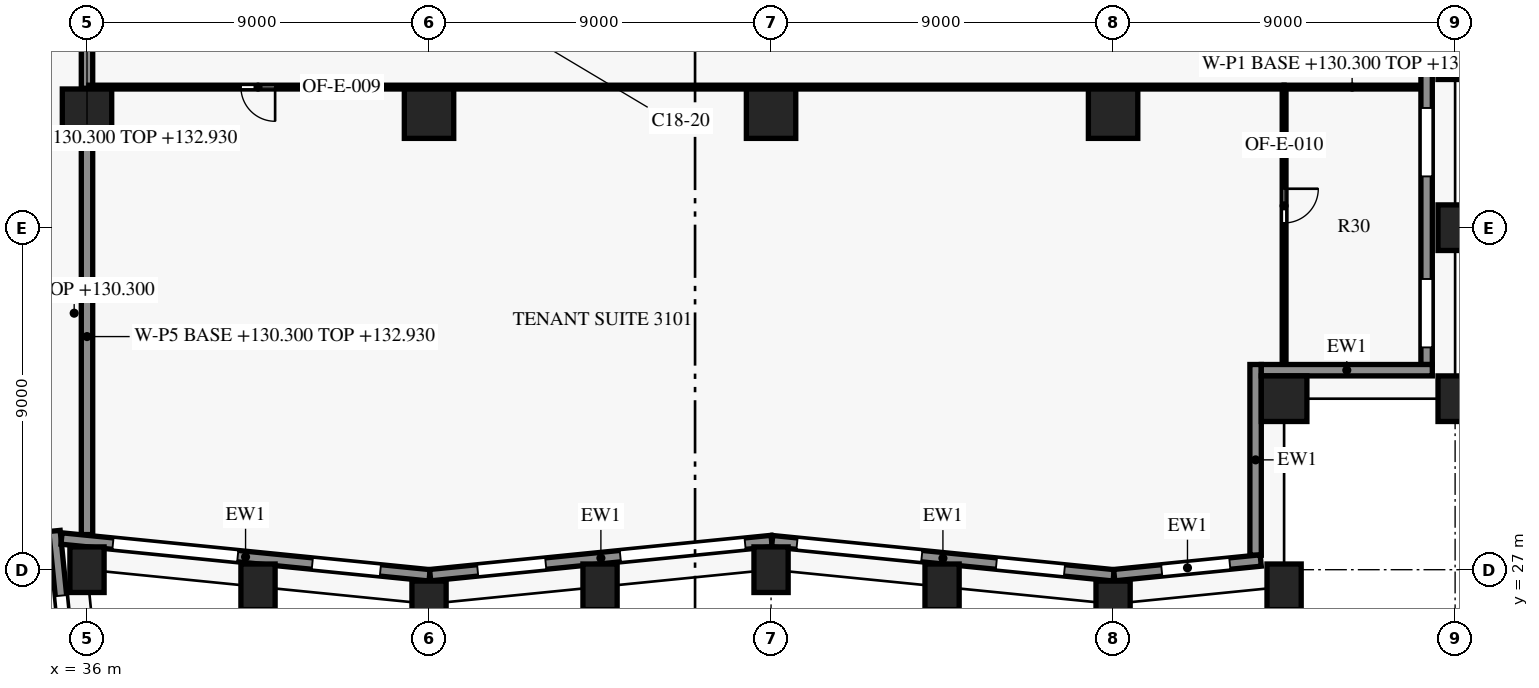
"""IFC4 building model, lengths in metres.
Left out: names, types, materials, properties, quantities, classifications, styles, units other than length and angle.
Written with IfcOpenShell. Run it as: python <this file> out.ifc"""

import sys

from ifc_helpers import new_model, si_unit, direction, frame, frame_2d, origin, origin_2d, place, context, subcontext, project, spatial, rectangle, extrude, element, fill, save


model = new_model("IFC4")
c1 = context("Model", 3, precision=1e-05, world=origin(), true_north=direction((0.0, 1.0)))
c2 = subcontext(c1, "Body", "Model", "MODEL_VIEW")
j1 = project(units=[si_unit("LENGTHUNIT", "METRE"), si_unit("PLANEANGLEUNIT", "RADIAN")], contexts=[c1])
p1 = place(None, origin())
s1 = spatial("IfcSite", under=j1, at=p1, CompositionType="ELEMENT")
p2 = place(p1, origin())
s2 = spatial("IfcBuilding", under=s1, at=p2, CompositionType="ELEMENT")
p3 = place(p2, frame((0.0, 0.0, 130.3)))
s3 = spatial("IfcBuildingStorey", under=s2, at=p3, CompositionType="ELEMENT", Elevation=130.3)
for number, where, z_axis, x_axis in (
    (1, (36.0, 27.0, 0.0), (0.0, 0.0, 1.0), (-0.1, 0.995, 0.0)),
    (2, (40.5, 26.55, 0.0), (0.0, 0.0, 1.0), (0.995, -0.1, 0.0)),
    (3, (45.0, 26.1, 0.0), (0.0, 0.0, 1.0), (1.0, 0.0, 0.0)),
    (4, (49.5, 26.55, 0.0), (0.0, 0.0, 1.0), (0.995, 0.1, 0.0)),
    (5, (54.0, 27.0, 0.0), (0.0, 0.0, 1.0), (1.0, 0.0, 0.0)),
    (6, (58.5, 26.55, 0.0), (0.0, 0.0, 1.0), (0.995, -0.1, 0.0)),
    (7, (63.0, 26.1, 0.0), (0.0, 0.0, 1.0), (1.0, 0.0, 0.0)),
    (8, (67.5, 26.55, 0.0), (0.0, 0.0, 1.0), (0.995, 0.1, 0.0)),
    (9, (72.0, 31.5, 0.0), (0.0, 0.0, 1.0), (0.0, 1.0, 0.0)),
    (10, (72.0, 36.0, 0.0), (0.0, 0.0, 1.0), (0.0, 1.0, 0.0)),
    (11, (72.0, 40.5, 0.0), (0.0, 0.0, 1.0), (0.0, 1.0, 0.0)),
):
    element("IfcColumn", number, at=place(p3, frame(where, z_axis=z_axis, x_axis=x_axis)), inside=s3, PredefinedType="COLUMN", context=c2, shape_type="SweptSolid", body=[
        extrude(rectangle(XDim=0.9, YDim=1.2, at=origin_2d()), origin(), (0.0, 0.0, 1.0), 3.8),
    ])
p4 = place(p3, frame((67.5, 31.5, 0.0), z_axis=(0.0, 0.0, 1.0), x_axis=(1.0, 0.0, 0.0)))
e12 = element("IfcColumn", 12, at=p4, inside=s3, PredefinedType="COLUMN", context=c2, shape_type="SweptSolid", body=[
    extrude(rectangle(XDim=1.2, YDim=1.2, at=origin_2d()), origin(), (0.0, 0.0, 1.0), 3.8),
])
for number, where, z_axis, x_axis in (
    (13, (36.0, 39.0, 0.0), (0.0, 0.0, 1.0), (1.0, 0.0, 0.0)),
    (14, (45.0, 39.0, 0.0), (0.0, 0.0, 1.0), (1.0, 0.0, 0.0)),
    (15, (54.0, 39.0, 0.0), (0.0, 0.0, 1.0), (1.0, 0.0, 0.0)),
    (16, (63.0, 39.0, 0.0), (0.0, 0.0, 1.0), (1.0, 0.0, 0.0)),
):
    element("IfcColumn", number, at=place(p3, frame(where, z_axis=z_axis, x_axis=x_axis)), inside=s3, PredefinedType="COLUMN", context=c2, shape_type="SweptSolid", body=[
        extrude(rectangle(XDim=1.3, YDim=1.3, at=origin_2d()), origin(), (0.0, 0.0, 1.0), 3.8),
    ])
p5 = place(p3, frame((35.144, 28.02, 0.0), z_axis=(0.0, 0.0, 1.0), x_axis=(0.099503719021, -0.99503719021, 0.0)))
e17 = element("IfcWall", 17, at=p5, inside=s3, PredefinedType="SOLIDWALL", context=c2, shape_type="SweptSolid", body=[
    extrude(rectangle(XDim=10.04, YDim=0.3, at=frame_2d((5.02, 0.0))), origin(), (0.0, 0.0, 1.0), 3.15),
])
p6 = place(p5, frame((1.711, 0.0, 0.15)))
e18 = element("IfcOpeningElement", 18, at=p6, cuts=e17, PredefinedType="OPENING", context=c2, shape_type="SweptSolid", body=[
    extrude(rectangle(XDim=3.3, YDim=2.4, at=frame_2d((1.65, 1.2))), frame((0.0, 0.16, 0.0), z_axis=(0.0, -1.0, 0.0), x_axis=(1.0, 0.0, 0.0)), (0.0, 0.0, 1.0), 0.32),
])
p7 = place(p5, frame((6.984, 0.0, 0.75)))
e19 = element("IfcOpeningElement", 19, at=p7, cuts=e17, PredefinedType="OPENING", context=c2, shape_type="SweptSolid", body=[
    extrude(rectangle(XDim=1.8, YDim=1.8, at=frame_2d((0.9, 0.9))), frame((0.0, 0.16, 0.0), z_axis=(0.0, -1.0, 0.0), x_axis=(1.0, 0.0, 0.0)), (0.0, 0.0, 1.0), 0.32),
])
p8 = place(p3, frame((45.015, 26.852, 0.0), z_axis=(0.0, 0.0, 1.0), x_axis=(-0.995037438546, 0.099501235631, 0.0)))
e20 = element("IfcWall", 20, at=p8, inside=s3, PredefinedType="SOLIDWALL", context=c2, shape_type="SweptSolid", body=[
    extrude(rectangle(XDim=9.734, YDim=0.3, at=frame_2d((4.867, 0.0))), origin(), (0.0, 0.0, 1.0), 3.15),
])
p9 = place(p8, frame((1.301, 0.0, 0.75)))
e21 = element("IfcOpeningElement", 21, at=p9, cuts=e20, PredefinedType="OPENING", context=c2, shape_type="SweptSolid", body=[
    extrude(rectangle(XDim=1.8, YDim=1.8, at=frame_2d((0.9, 0.9))), frame((0.0, 0.16, 0.0), z_axis=(0.0, -1.0, 0.0), x_axis=(1.0, 0.0, 0.0)), (0.0, 0.0, 1.0), 0.32),
])
p10 = place(p8, frame((5.073, 0.0, 0.15)))
e22 = element("IfcOpeningElement", 22, at=p10, cuts=e20, PredefinedType="OPENING", context=c2, shape_type="SweptSolid", body=[
    extrude(rectangle(XDim=3.3, YDim=2.4, at=frame_2d((1.65, 1.2))), frame((0.0, 0.16, 0.0), z_axis=(0.0, -1.0, 0.0), x_axis=(1.0, 0.0, 0.0)), (0.0, 0.0, 1.0), 0.32),
])
p11 = place(p3, frame((54.015, 27.755, 0.0), z_axis=(0.0, 0.0, 1.0), x_axis=(-0.995037993253, -0.099495688264, 0.0)))
e23 = element("IfcWall", 23, at=p11, inside=s3, PredefinedType="SOLIDWALL", context=c2, shape_type="SweptSolid", body=[
    extrude(rectangle(XDim=9.03, YDim=0.3, at=frame_2d((4.515, 0.0))), origin(), (0.0, 0.0, 1.0), 3.15),
])
p12 = place(p11, frame((0.701, 0.0, 0.15)))
e24 = element("IfcOpeningElement", 24, at=p12, cuts=e23, PredefinedType="OPENING", context=c2, shape_type="SweptSolid", body=[
    extrude(rectangle(XDim=3.3, YDim=2.4, at=frame_2d((1.65, 1.2))), frame((0.0, 0.16, 0.0), z_axis=(0.0, -1.0, 0.0), x_axis=(1.0, 0.0, 0.0)), (0.0, 0.0, 1.0), 0.32),
])
p13 = place(p11, frame((5.974, 0.0, 0.75)))
e25 = element("IfcOpeningElement", 25, at=p13, cuts=e23, PredefinedType="OPENING", context=c2, shape_type="SweptSolid", body=[
    extrude(rectangle(XDim=1.8, YDim=1.8, at=frame_2d((0.9, 0.9))), frame((0.0, 0.16, 0.0), z_axis=(0.0, -1.0, 0.0), x_axis=(1.0, 0.0, 0.0)), (0.0, 0.0, 1.0), 0.32),
])
p14 = place(p3, frame((63.015, 26.852, 0.0), z_axis=(0.0, 0.0, 1.0), x_axis=(-0.995037993253, 0.099495688264, 0.0)))
e26 = element("IfcWall", 26, at=p14, inside=s3, PredefinedType="SOLIDWALL", context=c2, shape_type="SweptSolid", body=[
    extrude(rectangle(XDim=9.03, YDim=0.3, at=frame_2d((4.515, 0.0))), origin(), (0.0, 0.0, 1.0), 3.15),
])
p15 = place(p14, frame((1.301, 0.0, 0.75)))
e27 = element("IfcOpeningElement", 27, at=p15, cuts=e26, PredefinedType="OPENING", context=c2, shape_type="SweptSolid", body=[
    extrude(rectangle(XDim=1.8, YDim=1.8, at=frame_2d((0.9, 0.9))), frame((0.0, 0.16, 0.0), z_axis=(0.0, -1.0, 0.0), x_axis=(1.0, 0.0, 0.0)), (0.0, 0.0, 1.0), 0.32),
])
p16 = place(p14, frame((5.073, 0.0, 0.15)))
e28 = element("IfcOpeningElement", 28, at=p16, cuts=e26, PredefinedType="OPENING", context=c2, shape_type="SweptSolid", body=[
    extrude(rectangle(XDim=3.3, YDim=2.4, at=frame_2d((1.65, 1.2))), frame((0.0, 0.16, 0.0), z_axis=(0.0, -1.0, 0.0), x_axis=(1.0, 0.0, 0.0)), (0.0, 0.0, 1.0), 0.32),
])
p17 = place(p3, frame((66.885, 27.242, 0.0), z_axis=(0.0, 0.0, 1.0), x_axis=(-0.995037814081, -0.099497480111, 0.0)))
e29 = element("IfcWall", 29, at=p17, inside=s3, PredefinedType="SOLIDWALL", context=c2, shape_type="SweptSolid", body=[
    extrude(rectangle(XDim=3.875, YDim=0.3, at=frame_2d((1.937, 0.0))), origin(), (0.0, 0.0, 1.0), 3.15),
])
p18 = place(p17, frame((0.818, 0.0, 0.75)))
e30 = element("IfcOpeningElement", 30, at=p18, cuts=e29, PredefinedType="OPENING", context=c2, shape_type="SweptSolid", body=[
    extrude(rectangle(XDim=1.8, YDim=1.8, at=frame_2d((0.9, 0.9))), frame((0.0, 0.16, 0.0), z_axis=(0.0, -1.0, 0.0), x_axis=(1.0, 0.0, 0.0)), (0.0, 0.0, 1.0), 0.32),
])
p19 = place(p3, frame((66.75, 32.4, 0.0), z_axis=(0.0, 0.0, 1.0), x_axis=(0.0, -1.0, 0.0)))
e31 = element("IfcWall", 31, at=p19, inside=s3, PredefinedType="SOLIDWALL", context=c2, shape_type="SweptSolid", body=[
    extrude(rectangle(XDim=5.019, YDim=0.3, at=frame_2d((2.51, 0.0))), origin(), (0.0, 0.0, 1.0), 3.15),
])
p20 = place(p3, frame((71.4, 32.25, 0.0), z_axis=(0.0, 0.0, 1.0), x_axis=(-1.0, 0.0, 0.0)))
e32 = element("IfcWall", 32, at=p20, inside=s3, PredefinedType="SOLIDWALL", context=c2, shape_type="SweptSolid", body=[
    extrude(rectangle(XDim=4.5, YDim=0.3, at=frame_2d((2.25, 0.0))), origin(), (0.0, 0.0, 1.0), 3.15),
])
p21 = place(p3, frame((71.25, 57.9, 0.0), z_axis=(0.0, 0.0, 1.0), x_axis=(0.0, -1.0, 0.0)))
e33 = element("IfcWall", 33, at=p21, inside=s3, PredefinedType="SOLIDWALL", context=c2, shape_type="SweptSolid", body=[
    extrude(rectangle(XDim=25.502, YDim=0.3, at=frame_2d((12.751, 0.0))), origin(), (0.0, 0.0, 1.0), 3.15),
])
p22 = place(p21, frame((0.75, 0.0, 0.75)))
e34 = element("IfcOpeningElement", 34, at=p22, cuts=e33, PredefinedType="OPENING", context=c2, shape_type="SweptSolid", body=[
    extrude(rectangle(XDim=1.8, YDim=1.8, at=frame_2d((0.9, 0.9))), frame((0.0, 0.16, 0.0), z_axis=(0.0, -1.0, 0.0), x_axis=(1.0, 0.0, 0.0)), (0.0, 0.0, 1.0), 0.32),
])
p23 = place(p21, frame((5.25, 0.0, 0.75)))
e35 = element("IfcOpeningElement", 35, at=p23, cuts=e33, PredefinedType="OPENING", context=c2, shape_type="SweptSolid", body=[
    extrude(rectangle(XDim=1.8, YDim=1.8, at=frame_2d((0.9, 0.9))), frame((0.0, 0.16, 0.0), z_axis=(0.0, -1.0, 0.0), x_axis=(1.0, 0.0, 0.0)), (0.0, 0.0, 1.0), 0.32),
])
p24 = place(p21, frame((9.0, 0.0, 0.15)))
e36 = element("IfcOpeningElement", 36, at=p24, cuts=e33, PredefinedType="OPENING", context=c2, shape_type="SweptSolid", body=[
    extrude(rectangle(XDim=3.3, YDim=2.4, at=frame_2d((1.65, 1.2))), frame((0.0, 0.16, 0.0), z_axis=(0.0, -1.0, 0.0), x_axis=(1.0, 0.0, 0.0)), (0.0, 0.0, 1.0), 0.32),
])
p25 = place(p21, frame((13.5, 0.0, 0.15)))
e37 = element("IfcOpeningElement", 37, at=p25, cuts=e33, PredefinedType="OPENING", context=c2, shape_type="SweptSolid", body=[
    extrude(rectangle(XDim=3.3, YDim=2.4, at=frame_2d((1.65, 1.2))), frame((0.0, 0.16, 0.0), z_axis=(0.0, -1.0, 0.0), x_axis=(1.0, 0.0, 0.0)), (0.0, 0.0, 1.0), 0.32),
])
p26 = place(p21, frame((18.75, 0.0, 0.75)))
e38 = element("IfcOpeningElement", 38, at=p26, cuts=e33, PredefinedType="OPENING", context=c2, shape_type="SweptSolid", body=[
    extrude(rectangle(XDim=1.8, YDim=1.8, at=frame_2d((0.9, 0.9))), frame((0.0, 0.16, 0.0), z_axis=(0.0, -1.0, 0.0), x_axis=(1.0, 0.0, 0.0)), (0.0, 0.0, 1.0), 0.32),
])
p27 = place(p21, frame((23.25, 0.0, 0.75)))
e39 = element("IfcOpeningElement", 39, at=p27, cuts=e33, PredefinedType="OPENING", context=c2, shape_type="SweptSolid", body=[
    extrude(rectangle(XDim=1.8, YDim=1.8, at=frame_2d((0.9, 0.9))), frame((0.0, 0.16, 0.0), z_axis=(0.0, -1.0, 0.0), x_axis=(1.0, 0.0, 0.0)), (0.0, 0.0, 1.0), 0.32),
])
for number, where, z_axis, x_axis in (
    (40, (24.655, 27.0, 0.0), (0.0, 0.0, 1.0), (1.0, 0.0, 0.0)),
    (41, (36.0, 27.925, 0.0), (0.0, 0.0, 1.0), (0.0, 1.0, 0.0)),
):
    element("IfcWall", number, at=place(p3, frame(where, z_axis=z_axis, x_axis=x_axis)), inside=s3, PredefinedType="PARTITIONING", context=c2, shape_type="SweptSolid", body=[
        extrude(rectangle(XDim=10.42, YDim=0.3, at=frame_2d((5.21, 0.0))), origin(), (0.0, 0.0, 1.0), 2.63),
    ])
p28 = place(p3, frame((67.5, 39.65, 0.0), z_axis=(0.0, 0.0, 1.0), x_axis=(0.0, -1.0, 0.0)))
e42 = element("IfcWall", 42, at=p28, inside=s3, PredefinedType="PARTITIONING", context=c2, shape_type="SweptSolid", body=[
    extrude(rectangle(XDim=7.23, YDim=0.1, at=frame_2d((3.615, 0.0))), origin(), (0.0, 0.0, 1.0), 2.63),
])
p29 = place(p28, frame((2.625, 0.0, 0.0)))
e43 = element("IfcOpeningElement", 43, at=p29, cuts=e42, PredefinedType="OPENING", context=c2, shape_type="SweptSolid", body=[
    extrude(rectangle(XDim=0.9, YDim=2.1, at=frame_2d((0.45, 1.05))), frame((0.0, 0.06, 0.0), z_axis=(0.0, -1.0, 0.0), x_axis=(1.0, 0.0, 0.0)), (0.0, 0.0, 1.0), 0.12),
])
p30 = place(p3, frame((67.5, 39.7, 0.0), z_axis=(0.0, 0.0, 1.0), x_axis=(-1.0, 0.0, 0.0)))
e44 = element("IfcWall", 44, at=p30, inside=s3, PredefinedType="PARTITIONING", context=c2, shape_type="SweptSolid", body=[
    extrude(rectangle(XDim=31.45, YDim=0.1, at=frame_2d((15.725, 0.0))), origin(), (0.0, 0.0, 1.0), 2.63),
])
p31 = place(p30, frame((26.55, 0.0, 0.0)))
e45 = element("IfcOpeningElement", 45, at=p31, cuts=e44, PredefinedType="OPENING", context=c2, shape_type="SweptSolid", body=[
    extrude(rectangle(XDim=0.9, YDim=2.1, at=frame_2d((0.45, 1.05))), frame((0.0, 0.06, 0.0), z_axis=(0.0, -1.0, 0.0), x_axis=(1.0, 0.0, 0.0)), (0.0, 0.0, 1.0), 0.12),
])
p32 = place(p3, frame((71.08, 39.7, 0.0), z_axis=(0.0, 0.0, 1.0), x_axis=(-1.0, 0.0, 0.0)))
e46 = element("IfcWall", 46, at=p32, inside=s3, PredefinedType="PARTITIONING", context=c2, shape_type="SweptSolid", body=[
    extrude(rectangle(XDim=3.58, YDim=0.1, at=frame_2d((1.79, 0.0))), origin(), (0.0, 0.0, 1.0), 3.33),
])
p33 = place(p3, frame((36.0, 39.67, 0.0), z_axis=(0.0, 0.0, 1.0), x_axis=(0.0, 1.0, 0.0)))
e47 = element("IfcWall", 47, at=p33, inside=s3, PredefinedType="PARTITIONING", context=c2, shape_type="SweptSolid", body=[
    extrude(rectangle(XDim=3.18, YDim=0.3, at=frame_2d((1.59, 0.0))), origin(), (0.0, 0.0, 1.0), 2.63),
])
p34 = place(p6, origin())
e48 = element("IfcWindow", 48, at=p34, inside=s3, PartitioningType="SINGLE_PANEL", PredefinedType="WINDOW", context=c2, shape_type="SweptSolid", body=[
    extrude(rectangle(XDim=3.3, YDim=2.4, at=frame_2d((1.65, 1.2))), frame((0.0, 0.03, 0.0), z_axis=(0.0, -1.0, 0.0), x_axis=(1.0, 0.0, 0.0)), (0.0, 0.0, 1.0), 0.06),
])
fill(e18, e48)
p35 = place(p9, origin())
e49 = element("IfcWindow", 49, at=p35, inside=s3, PartitioningType="SINGLE_PANEL", PredefinedType="WINDOW", context=c2, shape_type="SweptSolid", body=[
    extrude(rectangle(XDim=1.8, YDim=1.8, at=frame_2d((0.9, 0.9))), frame((0.0, 0.03, 0.0), z_axis=(0.0, -1.0, 0.0), x_axis=(1.0, 0.0, 0.0)), (0.0, 0.0, 1.0), 0.06),
])
fill(e21, e49)
p36 = place(p10, origin())
e50 = element("IfcWindow", 50, at=p36, inside=s3, PartitioningType="SINGLE_PANEL", PredefinedType="WINDOW", context=c2, shape_type="SweptSolid", body=[
    extrude(rectangle(XDim=3.3, YDim=2.4, at=frame_2d((1.65, 1.2))), frame((0.0, 0.03, 0.0), z_axis=(0.0, -1.0, 0.0), x_axis=(1.0, 0.0, 0.0)), (0.0, 0.0, 1.0), 0.06),
])
fill(e22, e50)
p37 = place(p12, origin())
e51 = element("IfcWindow", 51, at=p37, inside=s3, PartitioningType="SINGLE_PANEL", PredefinedType="WINDOW", context=c2, shape_type="SweptSolid", body=[
    extrude(rectangle(XDim=3.3, YDim=2.4, at=frame_2d((1.65, 1.2))), frame((0.0, 0.03, 0.0), z_axis=(0.0, -1.0, 0.0), x_axis=(1.0, 0.0, 0.0)), (0.0, 0.0, 1.0), 0.06),
])
fill(e24, e51)
p38 = place(p13, origin())
e52 = element("IfcWindow", 52, at=p38, inside=s3, PartitioningType="SINGLE_PANEL", PredefinedType="WINDOW", context=c2, shape_type="SweptSolid", body=[
    extrude(rectangle(XDim=1.8, YDim=1.8, at=frame_2d((0.9, 0.9))), frame((0.0, 0.03, 0.0), z_axis=(0.0, -1.0, 0.0), x_axis=(1.0, 0.0, 0.0)), (0.0, 0.0, 1.0), 0.06),
])
fill(e25, e52)
p39 = place(p15, origin())
e53 = element("IfcWindow", 53, at=p39, inside=s3, PartitioningType="SINGLE_PANEL", PredefinedType="WINDOW", context=c2, shape_type="SweptSolid", body=[
    extrude(rectangle(XDim=1.8, YDim=1.8, at=frame_2d((0.9, 0.9))), frame((0.0, 0.03, 0.0), z_axis=(0.0, -1.0, 0.0), x_axis=(1.0, 0.0, 0.0)), (0.0, 0.0, 1.0), 0.06),
])
fill(e27, e53)
p40 = place(p16, origin())
e54 = element("IfcWindow", 54, at=p40, inside=s3, PartitioningType="SINGLE_PANEL", PredefinedType="WINDOW", context=c2, shape_type="SweptSolid", body=[
    extrude(rectangle(XDim=3.3, YDim=2.4, at=frame_2d((1.65, 1.2))), frame((0.0, 0.03, 0.0), z_axis=(0.0, -1.0, 0.0), x_axis=(1.0, 0.0, 0.0)), (0.0, 0.0, 1.0), 0.06),
])
fill(e28, e54)
p41 = place(p18, origin())
e55 = element("IfcWindow", 55, at=p41, inside=s3, PartitioningType="SINGLE_PANEL", PredefinedType="WINDOW", context=c2, shape_type="SweptSolid", body=[
    extrude(rectangle(XDim=1.8, YDim=1.8, at=frame_2d((0.9, 0.9))), frame((0.0, 0.03, 0.0), z_axis=(0.0, -1.0, 0.0), x_axis=(1.0, 0.0, 0.0)), (0.0, 0.0, 1.0), 0.06),
])
fill(e30, e55)
p42 = place(p26, origin())
e56 = element("IfcWindow", 56, at=p42, inside=s3, PartitioningType="SINGLE_PANEL", PredefinedType="WINDOW", context=c2, shape_type="SweptSolid", body=[
    extrude(rectangle(XDim=1.8, YDim=1.8, at=frame_2d((0.9, 0.9))), frame((0.0, 0.03, 0.0), z_axis=(0.0, -1.0, 0.0), x_axis=(1.0, 0.0, 0.0)), (0.0, 0.0, 1.0), 0.06),
])
fill(e38, e56)
p43 = place(p27, origin())
e57 = element("IfcWindow", 57, at=p43, inside=s3, PartitioningType="SINGLE_PANEL", PredefinedType="WINDOW", context=c2, shape_type="SweptSolid", body=[
    extrude(rectangle(XDim=1.8, YDim=1.8, at=frame_2d((0.9, 0.9))), frame((0.0, 0.03, 0.0), z_axis=(0.0, -1.0, 0.0), x_axis=(1.0, 0.0, 0.0)), (0.0, 0.0, 1.0), 0.06),
])
fill(e39, e57)
p44 = place(p31, origin())
e58 = element("IfcDoor", 58, at=p44, inside=s3, OperationType="SINGLE_SWING_LEFT", PredefinedType="DOOR", context=c2, shape_type="SweptSolid", body=[
    extrude(rectangle(XDim=0.9, YDim=2.1, at=frame_2d((0.45, 1.05))), frame((0.0, 0.025, 0.0), z_axis=(0.0, -1.0, 0.0), x_axis=(1.0, 0.0, 0.0)), (0.0, 0.0, 1.0), 0.05),
])
fill(e45, e58)
p45 = place(p29, origin())
e59 = element("IfcDoor", 59, at=p45, inside=s3, OperationType="SINGLE_SWING_LEFT", PredefinedType="DOOR", context=c2, shape_type="SweptSolid", body=[
    extrude(rectangle(XDim=0.9, YDim=2.1, at=frame_2d((0.45, 1.05))), frame((0.0, 0.025, 0.0), z_axis=(0.0, -1.0, 0.0), x_axis=(1.0, 0.0, 0.0)), (0.0, 0.0, 1.0), 0.05),
])
fill(e43, e59)
save(model, sys.argv[1])
